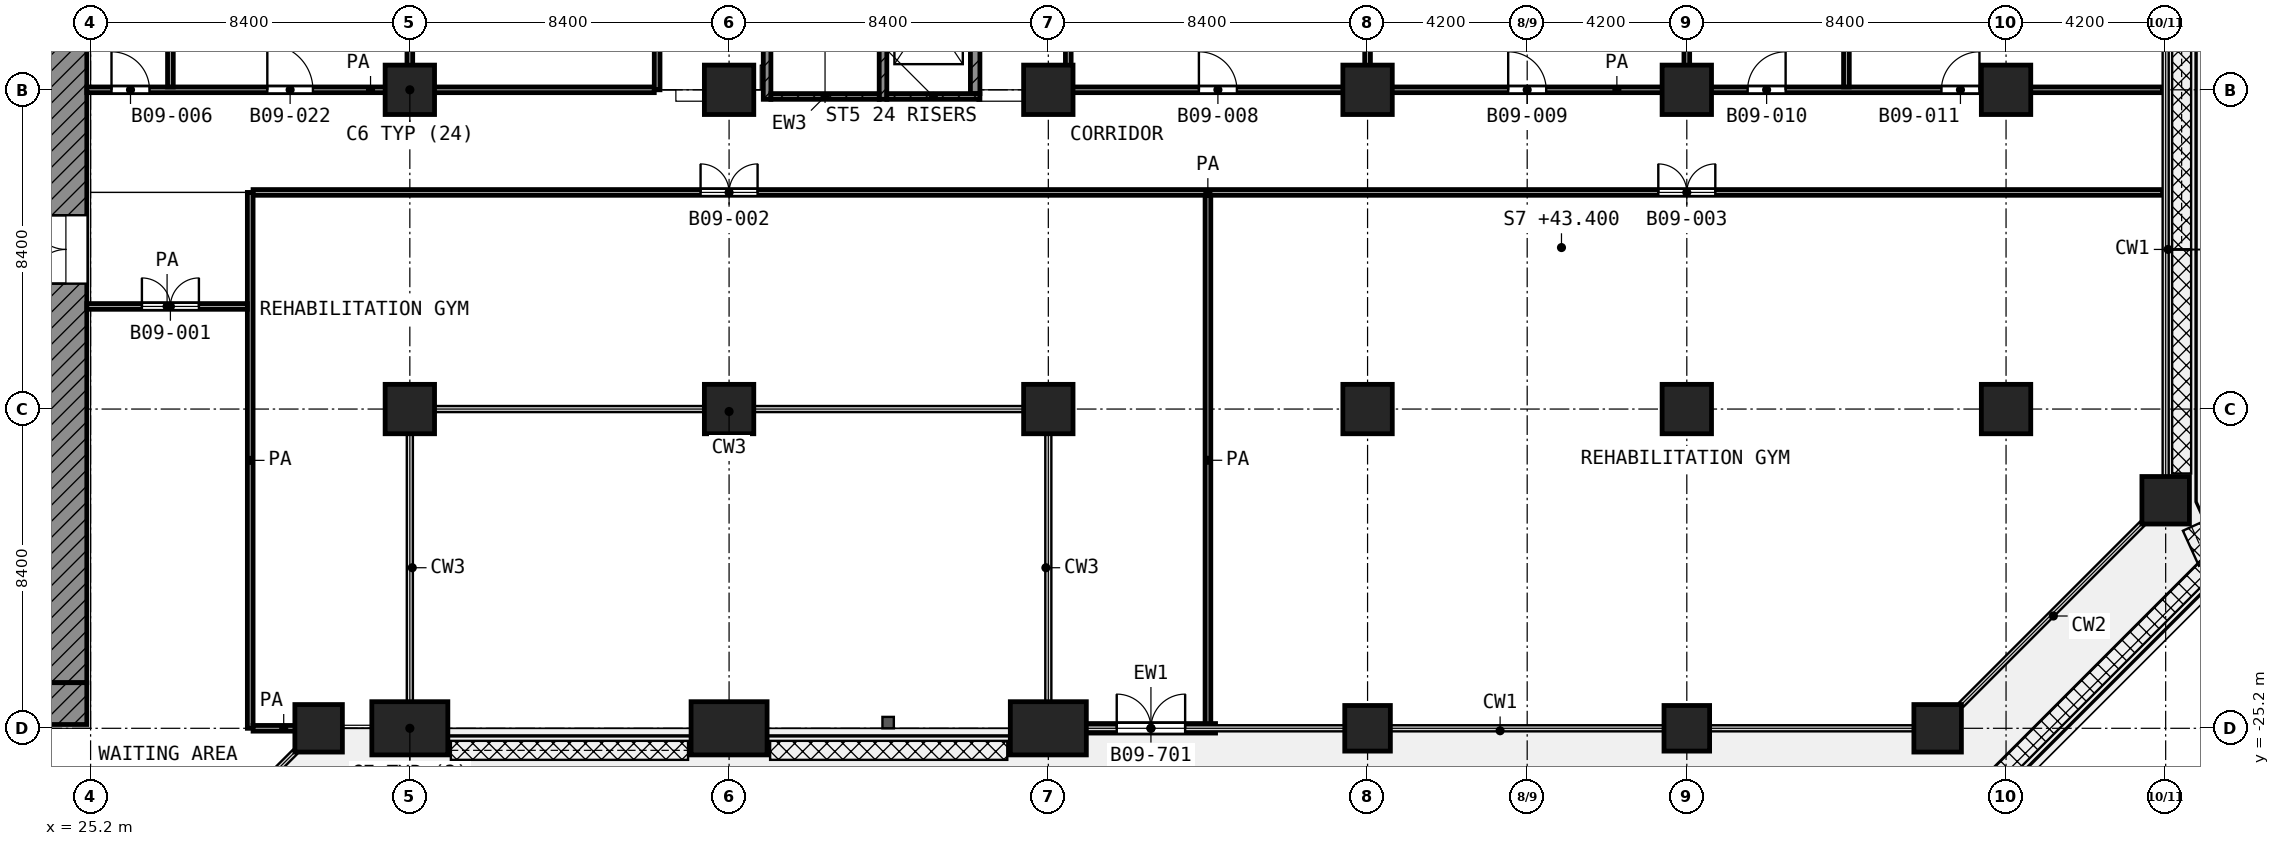
"""IFC4 building model, lengths in metres.
Left out: names, types, materials, properties, quantities, classifications, styles, units other than length and angle.
Written with IfcOpenShell. Run it as: python <this file> out.ifc"""

import sys

from ifc_helpers import new_model, si_unit, direction, frame, frame_2d, origin, origin_2d, place, context, subcontext, project, spatial, rectangle, extrude, element, fill, save


model = new_model("IFC4")
c1 = context("Model", 3, precision=1e-05, world=origin(), true_north=direction((0.0, 1.0)))
c2 = subcontext(c1, "Body", "Model", "MODEL_VIEW")
j1 = project(units=[si_unit("LENGTHUNIT", "METRE"), si_unit("PLANEANGLEUNIT", "RADIAN")], contexts=[c1])
p1 = place(None, origin())
s1 = spatial("IfcSite", under=j1, at=p1, CompositionType="ELEMENT")
p2 = place(p1, origin())
s2 = spatial("IfcBuilding", under=s1, at=p2, CompositionType="ELEMENT")
p3 = place(p2, frame((0.0, 0.0, 43.4)))
s3 = spatial("IfcBuildingStorey", under=s2, at=p3, CompositionType="ELEMENT", Elevation=43.4)
for number, where, z_axis, x_axis in (
    (1, (33.6, -8.4, 0.0), (0.0, 0.0, 1.0), (1.0, 0.0, 0.0)),
    (2, (42.0, -8.4, 0.0), (0.0, 0.0, 1.0), (1.0, 0.0, 0.0)),
    (3, (50.4, -8.4, 0.0), (0.0, 0.0, 1.0), (1.0, 0.0, 0.0)),
    (4, (58.8, -8.4, 0.0), (0.0, 0.0, 1.0), (1.0, 0.0, 0.0)),
    (5, (67.2, -8.4, 0.0), (0.0, 0.0, 1.0), (1.0, 0.0, 0.0)),
    (6, (75.6, -8.4, 0.0), (0.0, 0.0, 1.0), (1.0, 0.0, 0.0)),
    (7, (33.6, -16.8, 0.0), (0.0, 0.0, 1.0), (1.0, 0.0, 0.0)),
    (8, (42.0, -16.8, 0.0), (0.0, 0.0, 1.0), (1.0, 0.0, 0.0)),
    (9, (50.4, -16.8, 0.0), (0.0, 0.0, 1.0), (1.0, 0.0, 0.0)),
    (10, (58.8, -16.8, 0.0), (0.0, 0.0, 1.0), (1.0, 0.0, 0.0)),
    (11, (67.2, -16.8, 0.0), (0.0, 0.0, 1.0), (1.0, 0.0, 0.0)),
    (12, (75.6, -16.8, 0.0), (0.0, 0.0, 1.0), (1.0, 0.0, 0.0)),
):
    element("IfcColumn", number, at=place(p3, frame(where, z_axis=z_axis, x_axis=x_axis)), inside=s3, PredefinedType="COLUMN", context=c2, shape_type="SweptSolid", body=[
        extrude(rectangle(XDim=1.3, YDim=1.3, at=origin_2d()), origin(), (0.0, 0.0, 1.0), 4.2),
    ])
for number, where, z_axis, x_axis in (
    (13, (79.8, -19.2, 0.0), (0.0, 0.0, 1.0), (1.0, 0.0, 0.0)),
    (14, (31.2, -25.2, 0.0), (0.0, 0.0, 1.0), (1.0, 0.0, 0.0)),
):
    element("IfcColumn", number, at=place(p3, frame(where, z_axis=z_axis, x_axis=x_axis)), inside=s3, PredefinedType="COLUMN", context=c2, shape_type="SweptSolid", body=[
        extrude(rectangle(XDim=1.25, YDim=1.25, at=origin_2d()), origin(), (0.0, 0.0, 1.0), 4.2),
    ])
for number, where, z_axis, x_axis in (
    (15, (33.6, -25.2, 0.0), (0.0, 0.0, 1.0), (-1.0, 0.0, 0.0)),
    (16, (42.0, -25.2, 0.0), (0.0, 0.0, 1.0), (-1.0, 0.0, 0.0)),
    (17, (50.4, -25.2, 0.0), (0.0, 0.0, 1.0), (-1.0, 0.0, 0.0)),
):
    element("IfcColumn", number, at=place(p3, frame(where, z_axis=z_axis, x_axis=x_axis)), inside=s3, PredefinedType="COLUMN", context=c2, shape_type="SweptSolid", body=[
        extrude(rectangle(XDim=2.0, YDim=1.4, at=origin_2d()), origin(), (0.0, 0.0, 1.0), 4.2),
    ])
for number, where, z_axis, x_axis in (
    (18, (58.8, -25.2, 0.0), (0.0, 0.0, 1.0), (1.0, 0.0, 0.0)),
    (19, (67.2, -25.2, 0.0), (0.0, 0.0, 1.0), (1.0, 0.0, 0.0)),
):
    element("IfcColumn", number, at=place(p3, frame(where, z_axis=z_axis, x_axis=x_axis)), inside=s3, PredefinedType="COLUMN", context=c2, shape_type="SweptSolid", body=[
        extrude(rectangle(XDim=1.2, YDim=1.2, at=origin_2d()), origin(), (0.0, 0.0, 1.0), 4.2),
    ])
p4 = place(p3, frame((73.8, -25.2, 0.0), z_axis=(0.0, 0.0, 1.0), x_axis=(1.0, 0.0, 0.0)))
e20 = element("IfcColumn", 20, at=p4, inside=s3, PredefinedType="COLUMN", context=c2, shape_type="SweptSolid", body=[
    extrude(rectangle(XDim=1.25, YDim=1.25, at=origin_2d()), origin(), (0.0, 0.0, 1.0), 4.2),
])
p5 = place(p3, frame((51.4, -25.2, 0.0), z_axis=(0.0, 0.0, 1.0), x_axis=(1.0, 0.0, 0.0)))
e21 = element("IfcWall", 21, at=p5, inside=s3, PredefinedType="SOLIDWALL", context=c2, shape_type="SweptSolid", body=[
    extrude(rectangle(XDim=3.4, YDim=0.25, at=frame_2d((1.7, 0.0))), origin(), (0.0, 0.0, 1.0), 3.78),
])
p6 = place(p5, frame((0.8, 0.0, 0.0)))
e22 = element("IfcOpeningElement", 22, at=p6, cuts=e21, PredefinedType="OPENING", context=c2, shape_type="SweptSolid", body=[
    extrude(rectangle(XDim=1.8, YDim=2.1, at=frame_2d((0.9, 1.05))), frame((0.0, 0.135, 0.0), z_axis=(0.0, -1.0, 0.0), x_axis=(1.0, 0.0, 0.0)), (0.0, 0.0, 1.0), 0.27),
])
p7 = place(p3, frame((24.55, -24.0, 0.0), z_axis=(0.0, 0.0, 1.0), x_axis=(0.0, 1.0, 0.0)))
e23 = element("IfcWall", 23, at=p7, inside=s3, PredefinedType="SHEAR", context=c2, shape_type="SweptSolid", body=[
    extrude(rectangle(XDim=18.6, YDim=1.1, at=frame_2d((9.3, 0.0))), origin(), (0.0, 0.0, 1.0), 3.9),
])
p8 = place(p7, frame((10.5, 0.0, 0.0)))
e24 = element("IfcOpeningElement", 24, at=p8, cuts=e23, PredefinedType="OPENING", context=c2, shape_type="SweptSolid", body=[
    extrude(rectangle(XDim=1.8, YDim=2.1, at=frame_2d((0.9, 1.05))), frame((0.0, 0.56, 0.0), z_axis=(0.0, -1.0, 0.0), x_axis=(1.0, 0.0, 0.0)), (0.0, 0.0, 1.0), 1.12),
])
p9 = place(p3, frame((24.55, -25.1, 0.0), z_axis=(0.0, 0.0, 1.0), x_axis=(0.0, 1.0, 0.0)))
e25 = element("IfcWall", 25, at=p9, inside=s3, PredefinedType="SHEAR", context=c2, shape_type="SweptSolid", body=[
    extrude(rectangle(XDim=1.1, YDim=1.1, at=frame_2d((0.55, 0.0))), origin(), (0.0, 0.0, 1.0), 3.9),
])
p10 = place(p3, frame((43.0, -8.65, 0.0), z_axis=(0.0, 0.0, 1.0), x_axis=(0.0, 1.0, 0.0)))
e26 = element("IfcWall", 26, at=p10, inside=s3, PredefinedType="SHEAR", context=c2, shape_type="SweptSolid", body=[
    extrude(rectangle(XDim=8.35, YDim=0.2, at=frame_2d((4.175, 0.0))), origin(), (0.0, 0.0, 1.0), 3.9),
])
p11 = place(p10, frame((7.0, 0.0, 0.0)))
e27 = element("IfcOpeningElement", 27, at=p11, cuts=e26, PredefinedType="OPENING", context=c2, shape_type="SweptSolid", body=[
    extrude(rectangle(XDim=1.1, YDim=2.1, at=frame_2d((0.55, 1.05))), frame((0.0, 0.11, 0.0), z_axis=(0.0, -1.0, 0.0), x_axis=(1.0, 0.0, 0.0)), (0.0, 0.0, 1.0), 0.22),
])
p12 = place(p3, frame((46.05, -8.65, 0.0), z_axis=(0.0, 0.0, 1.0), x_axis=(0.0, 1.0, 0.0)))
e28 = element("IfcWall", 28, at=p12, inside=s3, PredefinedType="SHEAR", context=c2, shape_type="SweptSolid", body=[
    extrude(rectangle(XDim=8.35, YDim=0.2, at=frame_2d((4.175, 0.0))), origin(), (0.0, 0.0, 1.0), 3.9),
])
p13 = place(p12, frame((7.0, 0.0, 0.0)))
e29 = element("IfcOpeningElement", 29, at=p13, cuts=e28, PredefinedType="OPENING", context=c2, shape_type="SweptSolid", body=[
    extrude(rectangle(XDim=1.1, YDim=2.1, at=frame_2d((0.55, 1.05))), frame((0.0, 0.11, 0.0), z_axis=(0.0, -1.0, 0.0), x_axis=(1.0, 0.0, 0.0)), (0.0, 0.0, 1.0), 0.22),
])
p14 = place(p3, frame((43.1, -8.575, 0.0), z_axis=(0.0, 0.0, 1.0), x_axis=(1.0, 0.0, 0.0)))
e30 = element("IfcWall", 30, at=p14, inside=s3, PredefinedType="SHEAR", context=c2, shape_type="SweptSolid", body=[
    extrude(rectangle(XDim=2.85, YDim=0.15, at=frame_2d((1.425, 0.0))), origin(), (0.0, 0.0, 1.0), 3.9),
])
p15 = place(p3, frame((46.15, -8.575, 0.0), z_axis=(0.0, 0.0, 1.0), x_axis=(1.0, 0.0, 0.0)))
e31 = element("IfcWall", 31, at=p15, inside=s3, PredefinedType="SHEAR", context=c2, shape_type="SweptSolid", body=[
    extrude(rectangle(XDim=2.45, YDim=0.15, at=frame_2d((1.225, 0.0))), origin(), (0.0, 0.0, 1.0), 3.9),
])
p16 = place(p3, frame((48.475, -8.5, 0.0), z_axis=(0.0, 0.0, 1.0), x_axis=(0.0, 1.0, 0.0)))
e32 = element("IfcWall", 32, at=p16, inside=s3, PredefinedType="SHEAR", context=c2, shape_type="SweptSolid", body=[
    extrude(rectangle(XDim=3.475, YDim=0.25, at=frame_2d((1.738, 0.0))), origin(), (0.0, 0.0, 1.0), 3.9),
])
p17 = place(p3, frame((29.475, -25.2, 0.0), z_axis=(0.0, 0.0, 1.0), x_axis=(1.0, 0.0, 0.0)))
e33 = element("IfcWall", 33, at=p17, inside=s3, PredefinedType="PARTITIONING", context=c2, shape_type="SweptSolid", body=[
    extrude(rectangle(XDim=1.612, YDim=0.15, at=frame_2d((0.806, 0.0))), origin(), (0.0, 0.0, 1.0), 3.9),
])
p18 = place(p3, frame((25.1, -14.1, 0.0), z_axis=(0.0, 0.0, 1.0), x_axis=(1.0, 0.0, 0.0)))
e34 = element("IfcWall", 34, at=p18, inside=s3, PredefinedType="PARTITIONING", context=c2, shape_type="SweptSolid", body=[
    extrude(rectangle(XDim=4.225, YDim=0.15, at=frame_2d((2.112, 0.0))), origin(), (0.0, 0.0, 1.0), 3.9),
])
p19 = place(p18, frame((1.45, 0.0, 0.0)))
e35 = element("IfcOpeningElement", 35, at=p19, cuts=e34, PredefinedType="OPENING", context=c2, shape_type="SweptSolid", body=[
    extrude(rectangle(XDim=1.5, YDim=2.1, at=frame_2d((0.75, 1.05))), frame((0.0, 0.085, 0.0), z_axis=(0.0, -1.0, 0.0), x_axis=(1.0, 0.0, 0.0)), (0.0, 0.0, 1.0), 0.17),
])
p20 = place(p3, frame((29.475, -11.1, 0.0), z_axis=(0.0, 0.0, 1.0), x_axis=(1.0, 0.0, 0.0)))
e36 = element("IfcWall", 36, at=p20, inside=s3, PredefinedType="PARTITIONING", context=c2, shape_type="SweptSolid", body=[
    extrude(rectangle(XDim=50.245, YDim=0.15, at=frame_2d((25.123, 0.0))), origin(), (0.0, 0.0, 1.0), 3.9),
])
p21 = place(p20, frame((11.775, 0.0, 0.0)))
e37 = element("IfcOpeningElement", 37, at=p21, cuts=e36, PredefinedType="OPENING", context=c2, shape_type="SweptSolid", body=[
    extrude(rectangle(XDim=1.5, YDim=2.1, at=frame_2d((0.75, 1.05))), frame((0.0, 0.085, 0.0), z_axis=(0.0, -1.0, 0.0), x_axis=(1.0, 0.0, 0.0)), (0.0, 0.0, 1.0), 0.17),
])
p22 = place(p20, frame((36.975, 0.0, 0.0)))
e38 = element("IfcOpeningElement", 38, at=p22, cuts=e36, PredefinedType="OPENING", context=c2, shape_type="SweptSolid", body=[
    extrude(rectangle(XDim=1.5, YDim=2.1, at=frame_2d((0.75, 1.05))), frame((0.0, 0.085, 0.0), z_axis=(0.0, -1.0, 0.0), x_axis=(1.0, 0.0, 0.0)), (0.0, 0.0, 1.0), 0.17),
])
p23 = place(p3, frame((25.1, -8.4, 0.0), z_axis=(0.0, 0.0, 1.0), x_axis=(1.0, 0.0, 0.0)))
e39 = element("IfcWall", 39, at=p23, inside=s3, PredefinedType="PARTITIONING", context=c2, shape_type="SweptSolid", body=[
    extrude(rectangle(XDim=14.932, YDim=0.15, at=frame_2d((7.466, 0.0))), origin(), (0.0, 0.0, 1.0), 3.9),
])
p24 = place(p23, frame((0.65, 0.0, 0.0)))
e40 = element("IfcOpeningElement", 40, at=p24, cuts=e39, PredefinedType="OPENING", context=c2, shape_type="SweptSolid", body=[
    extrude(rectangle(XDim=1.0, YDim=2.1, at=frame_2d((0.5, 1.05))), frame((0.0, 0.085, 0.0), z_axis=(0.0, -1.0, 0.0), x_axis=(1.0, 0.0, 0.0)), (0.0, 0.0, 1.0), 0.17),
])
p25 = place(p23, frame((4.75, 0.0, 0.0)))
e41 = element("IfcOpeningElement", 41, at=p25, cuts=e39, PredefinedType="OPENING", context=c2, shape_type="SweptSolid", body=[
    extrude(rectangle(XDim=1.2, YDim=2.1, at=frame_2d((0.6, 1.05))), frame((0.0, 0.085, 0.0), z_axis=(0.0, -1.0, 0.0), x_axis=(1.0, 0.0, 0.0)), (0.0, 0.0, 1.0), 0.17),
])
p26 = place(p3, frame((51.0, -8.4, 0.0), z_axis=(0.0, 0.0, 1.0), x_axis=(1.0, 0.0, 0.0)))
e42 = element("IfcWall", 42, at=p26, inside=s3, PredefinedType="PARTITIONING", context=c2, shape_type="SweptSolid", body=[
    extrude(rectangle(XDim=28.72, YDim=0.15, at=frame_2d((14.36, 0.0))), origin(), (0.0, 0.0, 1.0), 3.9),
])
p27 = place(p26, frame((3.362, 0.0, 0.0)))
e43 = element("IfcOpeningElement", 43, at=p27, cuts=e42, PredefinedType="OPENING", context=c2, shape_type="SweptSolid", body=[
    extrude(rectangle(XDim=1.0, YDim=2.1, at=frame_2d((0.5, 1.05))), frame((0.0, 0.085, 0.0), z_axis=(0.0, -1.0, 0.0), x_axis=(1.0, 0.0, 0.0)), (0.0, 0.0, 1.0), 0.17),
])
p28 = place(p26, frame((11.5, 0.0, 0.0)))
e44 = element("IfcOpeningElement", 44, at=p28, cuts=e42, PredefinedType="OPENING", context=c2, shape_type="SweptSolid", body=[
    extrude(rectangle(XDim=1.0, YDim=2.1, at=frame_2d((0.5, 1.05))), frame((0.0, 0.085, 0.0), z_axis=(0.0, -1.0, 0.0), x_axis=(1.0, 0.0, 0.0)), (0.0, 0.0, 1.0), 0.17),
])
p29 = place(p26, frame((17.8, 0.0, 0.0)))
e45 = element("IfcOpeningElement", 45, at=p29, cuts=e42, PredefinedType="OPENING", context=c2, shape_type="SweptSolid", body=[
    extrude(rectangle(XDim=1.0, YDim=2.1, at=frame_2d((0.5, 1.05))), frame((0.0, 0.085, 0.0), z_axis=(0.0, -1.0, 0.0), x_axis=(1.0, 0.0, 0.0)), (0.0, 0.0, 1.0), 0.17),
])
p30 = place(p26, frame((22.9, 0.0, 0.0)))
e46 = element("IfcOpeningElement", 46, at=p30, cuts=e42, PredefinedType="OPENING", context=c2, shape_type="SweptSolid", body=[
    extrude(rectangle(XDim=1.0, YDim=2.1, at=frame_2d((0.5, 1.05))), frame((0.0, 0.085, 0.0), z_axis=(0.0, -1.0, 0.0), x_axis=(1.0, 0.0, 0.0)), (0.0, 0.0, 1.0), 0.17),
])
p31 = place(p3, frame((27.3, -8.325, 0.0), z_axis=(0.0, 0.0, 1.0), x_axis=(0.0, 1.0, 0.0)))
e47 = element("IfcWall", 47, at=p31, inside=s3, PredefinedType="PARTITIONING", context=c2, shape_type="SweptSolid", body=[
    extrude(rectangle(XDim=8.245, YDim=0.15, at=frame_2d((4.123, 0.0))), origin(), (0.0, 0.0, 1.0), 3.9),
])
p32 = place(p3, frame((29.4, -25.2, 0.0), z_axis=(0.0, 0.0, 1.0), x_axis=(0.0, 1.0, 0.0)))
e48 = element("IfcWall", 48, at=p32, inside=s3, PredefinedType="PARTITIONING", context=c2, shape_type="SweptSolid", body=[
    extrude(rectangle(XDim=14.1, YDim=0.15, at=frame_2d((7.05, 0.0))), origin(), (0.0, 0.0, 1.0), 3.9),
])
p33 = place(p3, frame((33.6, -8.325, 0.0), z_axis=(0.0, 0.0, 1.0), x_axis=(0.0, 1.0, 0.0)))
e49 = element("IfcWall", 49, at=p33, inside=s3, PredefinedType="PARTITIONING", context=c2, shape_type="SweptSolid", body=[
    extrude(rectangle(XDim=8.245, YDim=0.15, at=frame_2d((4.123, 0.0))), origin(), (0.0, 0.0, 1.0), 3.9),
])
p34 = place(p3, frame((40.107, -8.4, 0.0), z_axis=(0.0, 0.0, 1.0), x_axis=(0.0, 1.0, 0.0)))
e50 = element("IfcWall", 50, at=p34, inside=s3, PredefinedType="PARTITIONING", context=c2, shape_type="SweptSolid", body=[
    extrude(rectangle(XDim=8.32, YDim=0.15, at=frame_2d((4.16, 0.0))), origin(), (0.0, 0.0, 1.0), 3.9),
])
p35 = place(p34, frame((3.7, 0.0, 0.0)))
e51 = element("IfcOpeningElement", 51, at=p35, cuts=e50, PredefinedType="OPENING", context=c2, shape_type="SweptSolid", body=[
    extrude(rectangle(XDim=1.0, YDim=2.1, at=frame_2d((0.5, 1.05))), frame((0.0, 0.085, 0.0), z_axis=(0.0, -1.0, 0.0), x_axis=(1.0, 0.0, 0.0)), (0.0, 0.0, 1.0), 0.17),
])
p36 = place(p3, frame((50.925, -8.4, 0.0), z_axis=(0.0, 0.0, 1.0), x_axis=(0.0, 1.0, 0.0)))
e52 = element("IfcWall", 52, at=p36, inside=s3, PredefinedType="PARTITIONING", context=c2, shape_type="SweptSolid", body=[
    extrude(rectangle(XDim=6.548, YDim=0.15, at=frame_2d((3.274, 0.0))), origin(), (0.0, 0.0, 1.0), 3.9),
])
p37 = place(p3, frame((54.6, -25.12, 0.0), z_axis=(0.0, 0.0, 1.0), x_axis=(0.0, 1.0, 0.0)))
e53 = element("IfcWall", 53, at=p37, inside=s3, PredefinedType="PARTITIONING", context=c2, shape_type="SweptSolid", body=[
    extrude(rectangle(XDim=13.945, YDim=0.15, at=frame_2d((6.973, 0.0))), origin(), (0.0, 0.0, 1.0), 3.9),
])
for number, where, z_axis, x_axis in (
    (54, (58.8, -8.325, 0.0), (0.0, 0.0, 1.0), (0.0, 1.0, 0.0)),
    (55, (67.2, -8.325, 0.0), (0.0, 0.0, 1.0), (0.0, 1.0, 0.0)),
    (56, (71.4, -8.325, 0.0), (0.0, 0.0, 1.0), (0.0, 1.0, 0.0)),
):
    element("IfcWall", number, at=place(p3, frame(where, z_axis=z_axis, x_axis=x_axis)), inside=s3, PredefinedType="PARTITIONING", context=c2, shape_type="SweptSolid", body=[
        extrude(rectangle(XDim=8.245, YDim=0.15, at=frame_2d((4.123, 0.0))), origin(), (0.0, 0.0, 1.0), 3.9),
    ])
p38 = place(p6, origin())
e57 = element("IfcDoor", 57, at=p38, inside=s3, OperationType="DOUBLE_DOOR_SINGLE_SWING", PredefinedType="DOOR", context=c2, shape_type="SweptSolid", body=[
    extrude(rectangle(XDim=1.8, YDim=2.1, at=frame_2d((0.9, 1.05))), frame((0.0, 0.025, 0.0), z_axis=(0.0, -1.0, 0.0), x_axis=(1.0, 0.0, 0.0)), (0.0, 0.0, 1.0), 0.05),
])
fill(e22, e57)
p39 = place(p8, origin())
e58 = element("IfcDoor", 58, at=p39, inside=s3, OperationType="DOUBLE_DOOR_SINGLE_SWING", PredefinedType="DOOR", context=c2, shape_type="SweptSolid", body=[
    extrude(rectangle(XDim=1.8, YDim=2.1, at=frame_2d((0.9, 1.05))), frame((0.0, 0.025, 0.0), z_axis=(0.0, -1.0, 0.0), x_axis=(1.0, 0.0, 0.0)), (0.0, 0.0, 1.0), 0.05),
])
fill(e24, e58)
p40 = place(p19, origin())
e59 = element("IfcDoor", 59, at=p40, inside=s3, OperationType="DOUBLE_DOOR_SINGLE_SWING", PredefinedType="DOOR", context=c2, shape_type="SweptSolid", body=[
    extrude(rectangle(XDim=1.5, YDim=2.1, at=frame_2d((0.75, 1.05))), frame((0.0, 0.025, 0.0), z_axis=(0.0, -1.0, 0.0), x_axis=(1.0, 0.0, 0.0)), (0.0, 0.0, 1.0), 0.05),
])
fill(e35, e59)
p41 = place(p27, origin())
e60 = element("IfcDoor", 60, at=p41, inside=s3, OperationType="SINGLE_SWING_LEFT", PredefinedType="DOOR", context=c2, shape_type="SweptSolid", body=[
    extrude(rectangle(XDim=1.0, YDim=2.1, at=frame_2d((0.5, 1.05))), frame((0.0, 0.025, 0.0), z_axis=(0.0, -1.0, 0.0), x_axis=(1.0, 0.0, 0.0)), (0.0, 0.0, 1.0), 0.05),
])
fill(e43, e60)
p42 = place(p28, origin())
e61 = element("IfcDoor", 61, at=p42, inside=s3, OperationType="SINGLE_SWING_LEFT", PredefinedType="DOOR", context=c2, shape_type="SweptSolid", body=[
    extrude(rectangle(XDim=1.0, YDim=2.1, at=frame_2d((0.5, 1.05))), frame((0.0, 0.025, 0.0), z_axis=(0.0, -1.0, 0.0), x_axis=(1.0, 0.0, 0.0)), (0.0, 0.0, 1.0), 0.05),
])
fill(e44, e61)
p43 = place(p29, origin())
e62 = element("IfcDoor", 62, at=p43, inside=s3, OperationType="SINGLE_SWING_RIGHT", PredefinedType="DOOR", context=c2, shape_type="SweptSolid", body=[
    extrude(rectangle(XDim=1.0, YDim=2.1, at=frame_2d((0.5, 1.05))), frame((0.0, 0.025, 0.0), z_axis=(0.0, -1.0, 0.0), x_axis=(1.0, 0.0, 0.0)), (0.0, 0.0, 1.0), 0.05),
])
fill(e45, e62)
p44 = place(p30, origin())
e63 = element("IfcDoor", 63, at=p44, inside=s3, OperationType="SINGLE_SWING_RIGHT", PredefinedType="DOOR", context=c2, shape_type="SweptSolid", body=[
    extrude(rectangle(XDim=1.0, YDim=2.1, at=frame_2d((0.5, 1.05))), frame((0.0, 0.025, 0.0), z_axis=(0.0, -1.0, 0.0), x_axis=(1.0, 0.0, 0.0)), (0.0, 0.0, 1.0), 0.05),
])
fill(e46, e63)
p45 = place(p21, origin())
e64 = element("IfcDoor", 64, at=p45, inside=s3, OperationType="DOUBLE_DOOR_SINGLE_SWING", PredefinedType="DOOR", context=c2, shape_type="SweptSolid", body=[
    extrude(rectangle(XDim=1.5, YDim=2.1, at=frame_2d((0.75, 1.05))), frame((0.0, 0.025, 0.0), z_axis=(0.0, -1.0, 0.0), x_axis=(1.0, 0.0, 0.0)), (0.0, 0.0, 1.0), 0.05),
])
fill(e37, e64)
p46 = place(p22, origin())
e65 = element("IfcDoor", 65, at=p46, inside=s3, OperationType="DOUBLE_DOOR_SINGLE_SWING", PredefinedType="DOOR", context=c2, shape_type="SweptSolid", body=[
    extrude(rectangle(XDim=1.5, YDim=2.1, at=frame_2d((0.75, 1.05))), frame((0.0, 0.025, 0.0), z_axis=(0.0, -1.0, 0.0), x_axis=(1.0, 0.0, 0.0)), (0.0, 0.0, 1.0), 0.05),
])
fill(e38, e65)
p47 = place(p24, origin())
e66 = element("IfcDoor", 66, at=p47, inside=s3, OperationType="SINGLE_SWING_LEFT", PredefinedType="DOOR", context=c2, shape_type="SweptSolid", body=[
    extrude(rectangle(XDim=1.0, YDim=2.1, at=frame_2d((0.5, 1.05))), frame((0.0, 0.025, 0.0), z_axis=(0.0, -1.0, 0.0), x_axis=(1.0, 0.0, 0.0)), (0.0, 0.0, 1.0), 0.05),
])
fill(e40, e66)
p48 = place(p25, origin())
e67 = element("IfcDoor", 67, at=p48, inside=s3, OperationType="SINGLE_SWING_LEFT", PredefinedType="DOOR", context=c2, shape_type="SweptSolid", body=[
    extrude(rectangle(XDim=1.2, YDim=2.1, at=frame_2d((0.6, 1.05))), frame((0.0, 0.025, 0.0), z_axis=(0.0, -1.0, 0.0), x_axis=(1.0, 0.0, 0.0)), (0.0, 0.0, 1.0), 0.05),
])
fill(e41, e67)
save(model, sys.argv[1])
